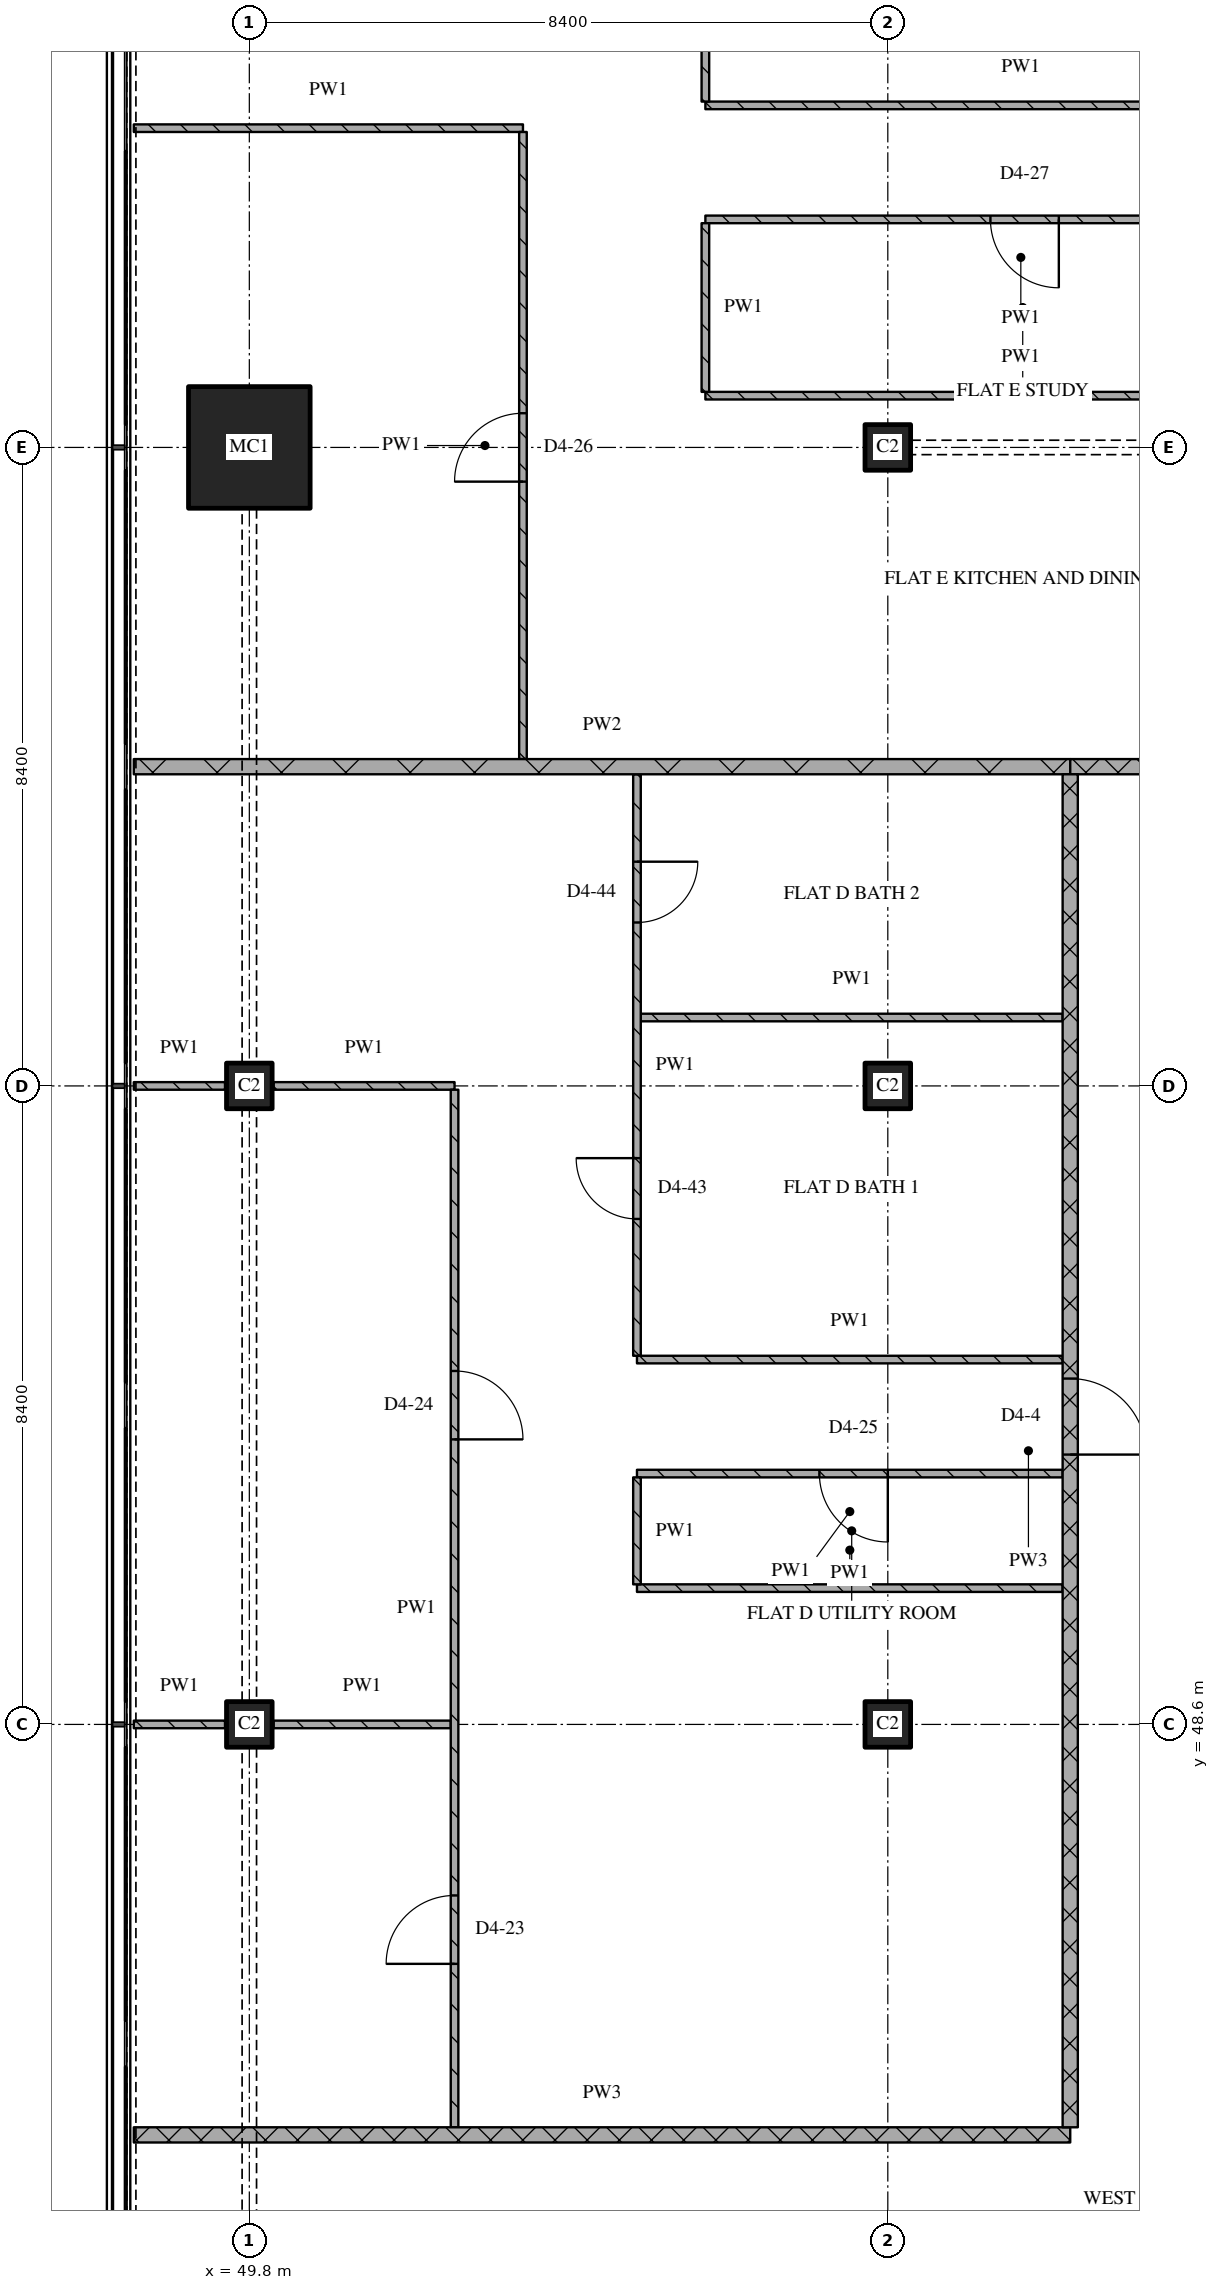
"""IFC4 building model, lengths in metres.
Left out: names, types, materials, properties, quantities, classifications, styles, units other than length and angle.
Written with IfcOpenShell. Run it as: python <this file> out.ifc"""

import sys

from ifc_helpers import new_model, si_unit, direction, frame, frame_2d, origin, origin_2d, place, context, subcontext, project, spatial, rectangle, extrude, element, fill, save


model = new_model("IFC4")
c1 = context("Model", 3, precision=1e-05, world=origin(), true_north=direction((0.0, 1.0)))
c2 = subcontext(c1, "Body", "Model", "MODEL_VIEW")
j1 = project(units=[si_unit("LENGTHUNIT", "METRE"), si_unit("PLANEANGLEUNIT", "RADIAN")], contexts=[c1])
p1 = place(None, origin())
s1 = spatial("IfcSite", under=j1, at=p1, CompositionType="ELEMENT")
p2 = place(p1, origin())
s2 = spatial("IfcBuilding", under=s1, at=p2, CompositionType="ELEMENT")
p3 = place(p2, frame((0.0, 0.0, 237.9)))
s3 = spatial("IfcBuildingStorey", under=s2, at=p3, CompositionType="ELEMENT", Elevation=237.9)
for number, where, z_axis, x_axis in (
    (1, (49.8, 48.6, 0.0), (0.0, 0.0, 1.0), (1.0, 0.0, 0.0)),
    (2, (49.8, 57.0, 0.0), (0.0, 0.0, 1.0), (1.0, 0.0, 0.0)),
):
    element("IfcColumn", number, at=place(p3, frame(where, z_axis=z_axis, x_axis=x_axis)), inside=s3, PredefinedType="COLUMN", context=c2, shape_type="SweptSolid", body=[
        extrude(rectangle(XDim=0.6, YDim=0.6, at=origin_2d()), origin(), (0.0, 0.0, 1.0), 3.6),
    ])
p4 = place(p3, frame((49.8, 65.4, 0.0), z_axis=(0.0, 0.0, 1.0), x_axis=(1.0, 0.0, 0.0)))
e3 = element("IfcColumn", 3, at=p4, inside=s3, PredefinedType="COLUMN", context=c2, shape_type="SweptSolid", body=[
    extrude(rectangle(XDim=1.6, YDim=1.6, at=origin_2d()), origin(), (0.0, 0.0, 1.0), 3.6),
])
for number, where, z_axis, x_axis in (
    (4, (58.2, 48.6, 0.0), (0.0, 0.0, 1.0), (1.0, 0.0, 0.0)),
    (5, (58.2, 57.0, 0.0), (0.0, 0.0, 1.0), (1.0, 0.0, 0.0)),
    (6, (58.2, 65.4, 0.0), (0.0, 0.0, 1.0), (1.0, 0.0, 0.0)),
):
    element("IfcColumn", number, at=place(p3, frame(where, z_axis=z_axis, x_axis=x_axis)), inside=s3, PredefinedType="COLUMN", context=c2, shape_type="SweptSolid", body=[
        extrude(rectangle(XDim=0.6, YDim=0.6, at=origin_2d()), origin(), (0.0, 0.0, 1.0), 3.6),
    ])
p5 = place(p3, frame((48.28, 43.2, 0.0), z_axis=(0.0, 0.0, 1.0), x_axis=(1.0, 0.0, 0.0)))
e7 = element("IfcWall", 7, at=p5, inside=s3, PredefinedType="PARTITIONING", context=c2, shape_type="SweptSolid", body=[
    extrude(rectangle(XDim=12.32, YDim=0.2, at=frame_2d((6.16, 0.0))), origin(), (0.0, 0.0, 1.0), 3.32),
])
p6 = place(p3, frame((48.28, 48.6, 0.0), z_axis=(0.0, 0.0, 1.0), x_axis=(1.0, 0.0, 0.0)))
e8 = element("IfcWall", 8, at=p6, inside=s3, PredefinedType="PARTITIONING", context=c2, shape_type="SweptSolid", body=[
    extrude(rectangle(XDim=1.2, YDim=0.1, at=frame_2d((0.6, 0.0))), origin(), (0.0, 0.0, 1.0), 3.32),
])
p7 = place(p3, frame((50.12, 48.6, 0.0), z_axis=(0.0, 0.0, 1.0), x_axis=(1.0, 0.0, 0.0)))
e9 = element("IfcWall", 9, at=p7, inside=s3, PredefinedType="PARTITIONING", context=c2, shape_type="SweptSolid", body=[
    extrude(rectangle(XDim=2.33, YDim=0.1, at=frame_2d((1.165, 0.0))), origin(), (0.0, 0.0, 1.0), 3.32),
])
p8 = place(p3, frame((54.9, 50.393, 0.0), z_axis=(0.0, 0.0, 1.0), x_axis=(1.0, 0.0, 0.0)))
e10 = element("IfcWall", 10, at=p8, inside=s3, PredefinedType="PARTITIONING", context=c2, shape_type="SweptSolid", body=[
    extrude(rectangle(XDim=5.6, YDim=0.1, at=frame_2d((2.8, 0.0))), origin(), (0.0, 0.0, 1.0), 3.32),
])
p9 = place(p3, frame((60.5, 51.9, 0.0), z_axis=(0.0, 0.0, 1.0), x_axis=(-1.0, 0.0, 0.0)))
e11 = element("IfcWall", 11, at=p9, inside=s3, PredefinedType="PARTITIONING", context=c2, shape_type="SweptSolid", body=[
    extrude(rectangle(XDim=5.6, YDim=0.1, at=frame_2d((2.8, 0.0))), origin(), (0.0, 0.0, 1.0), 3.32),
])
p10 = place(p9, frame((2.3, 0.0, 0.0)))
e12 = element("IfcOpeningElement", 12, at=p10, cuts=e11, PredefinedType="OPENING", context=c2, shape_type="SweptSolid", body=[
    extrude(rectangle(XDim=0.9, YDim=2.1, at=frame_2d((0.45, 1.05))), frame((0.0, 0.06, 0.0), z_axis=(0.0, -1.0, 0.0), x_axis=(1.0, 0.0, 0.0)), (0.0, 0.0, 1.0), 0.12),
])
p11 = place(p3, frame((54.9, 53.4, 0.0), z_axis=(0.0, 0.0, 1.0), x_axis=(1.0, 0.0, 0.0)))
e13 = element("IfcWall", 13, at=p11, inside=s3, PredefinedType="PARTITIONING", context=c2, shape_type="SweptSolid", body=[
    extrude(rectangle(XDim=5.6, YDim=0.1, at=frame_2d((2.8, 0.0))), origin(), (0.0, 0.0, 1.0), 3.32),
])
p12 = place(p3, frame((48.28, 57.0, 0.0), z_axis=(0.0, 0.0, 1.0), x_axis=(1.0, 0.0, 0.0)))
e14 = element("IfcWall", 14, at=p12, inside=s3, PredefinedType="PARTITIONING", context=c2, shape_type="SweptSolid", body=[
    extrude(rectangle(XDim=1.2, YDim=0.1, at=frame_2d((0.6, 0.0))), origin(), (0.0, 0.0, 1.0), 3.32),
])
p13 = place(p3, frame((50.12, 57.0, 0.0), z_axis=(0.0, 0.0, 1.0), x_axis=(1.0, 0.0, 0.0)))
e15 = element("IfcWall", 15, at=p13, inside=s3, PredefinedType="PARTITIONING", context=c2, shape_type="SweptSolid", body=[
    extrude(rectangle(XDim=2.38, YDim=0.1, at=frame_2d((1.19, 0.0))), origin(), (0.0, 0.0, 1.0), 3.32),
])
p14 = place(p3, frame((54.95, 57.9, 0.0), z_axis=(0.0, 0.0, 1.0), x_axis=(1.0, 0.0, 0.0)))
e16 = element("IfcWall", 16, at=p14, inside=s3, PredefinedType="PARTITIONING", context=c2, shape_type="SweptSolid", body=[
    extrude(rectangle(XDim=5.55, YDim=0.1, at=frame_2d((2.775, 0.0))), origin(), (0.0, 0.0, 1.0), 3.32),
])
p15 = place(p3, frame((60.6, 61.2, 0.0), z_axis=(0.0, 0.0, 1.0), x_axis=(1.0, 0.0, 0.0)))
e17 = element("IfcWall", 17, at=p15, inside=s3, PredefinedType="PARTITIONING", context=c2, shape_type="SweptSolid", body=[
    extrude(rectangle(XDim=3.6, YDim=0.2, at=frame_2d((1.8, 0.0))), origin(), (0.0, 0.0, 1.0), 3.32),
])
p16 = place(p3, frame((48.28, 61.2, 0.0), z_axis=(0.0, 0.0, 1.0), x_axis=(1.0, 0.0, 0.0)))
e18 = element("IfcWall", 18, at=p16, inside=s3, PredefinedType="PARTITIONING", context=c2, shape_type="SweptSolid", body=[
    extrude(rectangle(XDim=12.32, YDim=0.2, at=frame_2d((6.16, 0.0))), origin(), (0.0, 0.0, 1.0), 3.32),
])
p17 = place(p3, frame((55.8, 66.081, 0.0), z_axis=(0.0, 0.0, 1.0), x_axis=(1.0, 0.0, 0.0)))
e19 = element("IfcWall", 19, at=p17, inside=s3, PredefinedType="PARTITIONING", context=c2, shape_type="SweptSolid", body=[
    extrude(rectangle(XDim=8.3, YDim=0.1, at=frame_2d((4.15, 0.0))), origin(), (0.0, 0.0, 1.0), 3.32),
])
p18 = place(p3, frame((64.1, 68.4, 0.0), z_axis=(0.0, 0.0, 1.0), x_axis=(-1.0, 0.0, 0.0)))
e20 = element("IfcWall", 20, at=p18, inside=s3, PredefinedType="PARTITIONING", context=c2, shape_type="SweptSolid", body=[
    extrude(rectangle(XDim=8.3, YDim=0.1, at=frame_2d((4.15, 0.0))), origin(), (0.0, 0.0, 1.0), 3.32),
])
p19 = place(p18, frame((3.65, 0.0, 0.0)))
e21 = element("IfcOpeningElement", 21, at=p19, cuts=e20, PredefinedType="OPENING", context=c2, shape_type="SweptSolid", body=[
    extrude(rectangle(XDim=0.9, YDim=2.1, at=frame_2d((0.45, 1.05))), frame((0.0, 0.06, 0.0), z_axis=(0.0, -1.0, 0.0), x_axis=(1.0, 0.0, 0.0)), (0.0, 0.0, 1.0), 0.12),
])
p20 = place(p3, frame((48.28, 69.6, 0.0), z_axis=(0.0, 0.0, 1.0), x_axis=(1.0, 0.0, 0.0)))
e22 = element("IfcWall", 22, at=p20, inside=s3, PredefinedType="PARTITIONING", context=c2, shape_type="SweptSolid", body=[
    extrude(rectangle(XDim=5.12, YDim=0.1, at=frame_2d((2.56, 0.0))), origin(), (0.0, 0.0, 1.0), 3.32),
])
p21 = place(p3, frame((55.8, 69.9, 0.0), z_axis=(0.0, 0.0, 1.0), x_axis=(1.0, 0.0, 0.0)))
e23 = element("IfcWall", 23, at=p21, inside=s3, PredefinedType="PARTITIONING", context=c2, shape_type="SweptSolid", body=[
    extrude(rectangle(XDim=8.3, YDim=0.1, at=frame_2d((4.15, 0.0))), origin(), (0.0, 0.0, 1.0), 3.32),
])
p22 = place(p3, frame((52.5, 43.3, 0.0), z_axis=(0.0, 0.0, 1.0), x_axis=(0.0, 1.0, 0.0)))
e24 = element("IfcWall", 24, at=p22, inside=s3, PredefinedType="PARTITIONING", context=c2, shape_type="SweptSolid", body=[
    extrude(rectangle(XDim=13.65, YDim=0.1, at=frame_2d((6.825, 0.0))), origin(), (0.0, 0.0, 1.0), 3.32),
])
p23 = place(p22, frame((2.15, 0.0, 0.0)))
e25 = element("IfcOpeningElement", 25, at=p23, cuts=e24, PredefinedType="OPENING", context=c2, shape_type="SweptSolid", body=[
    extrude(rectangle(XDim=0.9, YDim=2.1, at=frame_2d((0.45, 1.05))), frame((0.0, 0.06, 0.0), z_axis=(0.0, -1.0, 0.0), x_axis=(1.0, 0.0, 0.0)), (0.0, 0.0, 1.0), 0.12),
])
p24 = place(p22, frame((9.05, 0.0, 0.0)))
e26 = element("IfcOpeningElement", 26, at=p24, cuts=e24, PredefinedType="OPENING", context=c2, shape_type="SweptSolid", body=[
    extrude(rectangle(XDim=0.9, YDim=2.1, at=frame_2d((0.45, 1.05))), frame((0.0, 0.06, 0.0), z_axis=(0.0, -1.0, 0.0), x_axis=(1.0, 0.0, 0.0)), (0.0, 0.0, 1.0), 0.12),
])
p25 = place(p3, frame((53.4, 61.3, 0.0), z_axis=(0.0, 0.0, 1.0), x_axis=(0.0, 1.0, 0.0)))
e27 = element("IfcWall", 27, at=p25, inside=s3, PredefinedType="PARTITIONING", context=c2, shape_type="SweptSolid", body=[
    extrude(rectangle(XDim=8.25, YDim=0.1, at=frame_2d((4.125, 0.0))), origin(), (0.0, 0.0, 1.0), 3.32),
])
p26 = place(p25, frame((3.65, 0.0, 0.0)))
e28 = element("IfcOpeningElement", 28, at=p26, cuts=e27, PredefinedType="OPENING", context=c2, shape_type="SweptSolid", body=[
    extrude(rectangle(XDim=0.9, YDim=2.1, at=frame_2d((0.45, 1.05))), frame((0.0, 0.06, 0.0), z_axis=(0.0, -1.0, 0.0), x_axis=(1.0, 0.0, 0.0)), (0.0, 0.0, 1.0), 0.12),
])
p27 = place(p3, frame((54.9, 51.85, 0.0), z_axis=(0.0, 0.0, 1.0), x_axis=(0.0, -1.0, 0.0)))
e29 = element("IfcWall", 29, at=p27, inside=s3, PredefinedType="PARTITIONING", context=c2, shape_type="SweptSolid", body=[
    extrude(rectangle(XDim=1.407, YDim=0.1, at=frame_2d((0.704, 0.0))), origin(), (0.0, 0.0, 1.0), 3.32),
])
p28 = place(p3, frame((54.9, 61.1, 0.0), z_axis=(0.0, 0.0, 1.0), x_axis=(0.0, -1.0, 0.0)))
e30 = element("IfcWall", 30, at=p28, inside=s3, PredefinedType="PARTITIONING", context=c2, shape_type="SweptSolid", body=[
    extrude(rectangle(XDim=7.65, YDim=0.1, at=frame_2d((3.825, 0.0))), origin(), (0.0, 0.0, 1.0), 3.32),
])
p29 = place(p28, frame((1.15, 0.0, 0.0)))
e31 = element("IfcOpeningElement", 31, at=p29, cuts=e30, PredefinedType="OPENING", context=c2, shape_type="SweptSolid", body=[
    extrude(rectangle(XDim=0.8, YDim=2.1, at=frame_2d((0.4, 1.05))), frame((0.0, 0.06, 0.0), z_axis=(0.0, -1.0, 0.0), x_axis=(1.0, 0.0, 0.0)), (0.0, 0.0, 1.0), 0.12),
])
p30 = place(p28, frame((5.05, 0.0, 0.0)))
e32 = element("IfcOpeningElement", 32, at=p30, cuts=e30, PredefinedType="OPENING", context=c2, shape_type="SweptSolid", body=[
    extrude(rectangle(XDim=0.8, YDim=2.1, at=frame_2d((0.4, 1.05))), frame((0.0, 0.06, 0.0), z_axis=(0.0, -1.0, 0.0), x_axis=(1.0, 0.0, 0.0)), (0.0, 0.0, 1.0), 0.12),
])
p31 = place(p3, frame((55.8, 68.35, 0.0), z_axis=(0.0, 0.0, 1.0), x_axis=(0.0, -1.0, 0.0)))
e33 = element("IfcWall", 33, at=p31, inside=s3, PredefinedType="PARTITIONING", context=c2, shape_type="SweptSolid", body=[
    extrude(rectangle(XDim=2.219, YDim=0.1, at=frame_2d((1.109, 0.0))), origin(), (0.0, 0.0, 1.0), 3.32),
])
p32 = place(p3, frame((55.8, 75.32, 0.0), z_axis=(0.0, 0.0, 1.0), x_axis=(0.0, -1.0, 0.0)))
e34 = element("IfcWall", 34, at=p32, inside=s3, PredefinedType="PARTITIONING", context=c2, shape_type="SweptSolid", body=[
    extrude(rectangle(XDim=5.37, YDim=0.1, at=frame_2d((2.685, 0.0))), origin(), (0.0, 0.0, 1.0), 3.32),
])
p33 = place(p32, frame((0.542, 0.0, 0.0)))
e35 = element("IfcOpeningElement", 35, at=p33, cuts=e34, PredefinedType="OPENING", context=c2, shape_type="SweptSolid", body=[
    extrude(rectangle(XDim=0.9, YDim=2.1, at=frame_2d((0.45, 1.05))), frame((0.0, 0.06, 0.0), z_axis=(0.0, -1.0, 0.0), x_axis=(1.0, 0.0, 0.0)), (0.0, 0.0, 1.0), 0.12),
])
p34 = place(p32, frame((3.443, 0.0, 0.0)))
e36 = element("IfcOpeningElement", 36, at=p34, cuts=e34, PredefinedType="OPENING", context=c2, shape_type="SweptSolid", body=[
    extrude(rectangle(XDim=0.8, YDim=2.1, at=frame_2d((0.4, 1.05))), frame((0.0, 0.06, 0.0), z_axis=(0.0, -1.0, 0.0), x_axis=(1.0, 0.0, 0.0)), (0.0, 0.0, 1.0), 0.12),
])
p35 = place(p3, frame((60.6, 43.3, 0.0), z_axis=(0.0, 0.0, 1.0), x_axis=(0.0, 1.0, 0.0)))
e37 = element("IfcWall", 37, at=p35, inside=s3, PredefinedType="PARTITIONING", context=c2, shape_type="SweptSolid", body=[
    extrude(rectangle(XDim=17.8, YDim=0.2, at=frame_2d((8.9, 0.0))), origin(), (0.0, 0.0, 1.0), 3.32),
])
p36 = place(p35, frame((8.85, 0.0, 0.0)))
e38 = element("IfcOpeningElement", 38, at=p36, cuts=e37, PredefinedType="OPENING", context=c2, shape_type="SweptSolid", body=[
    extrude(rectangle(XDim=1.0, YDim=2.1, at=frame_2d((0.5, 1.05))), frame((0.0, 0.11, 0.0), z_axis=(0.0, -1.0, 0.0), x_axis=(1.0, 0.0, 0.0)), (0.0, 0.0, 1.0), 0.22),
])
p37 = place(p10, origin())
e39 = element("IfcDoor", 39, at=p37, inside=s3, OperationType="SINGLE_SWING_LEFT", PredefinedType="DOOR", context=c2, shape_type="SweptSolid", body=[
    extrude(rectangle(XDim=0.9, YDim=2.1, at=frame_2d((0.45, 1.05))), frame((0.0, 0.025, 0.0), z_axis=(0.0, -1.0, 0.0), x_axis=(1.0, 0.0, 0.0)), (0.0, 0.0, 1.0), 0.05),
])
fill(e12, e39)
p38 = place(p19, origin())
e40 = element("IfcDoor", 40, at=p38, inside=s3, OperationType="SINGLE_SWING_LEFT", PredefinedType="DOOR", context=c2, shape_type="SweptSolid", body=[
    extrude(rectangle(XDim=0.9, YDim=2.1, at=frame_2d((0.45, 1.05))), frame((0.0, 0.025, 0.0), z_axis=(0.0, -1.0, 0.0), x_axis=(1.0, 0.0, 0.0)), (0.0, 0.0, 1.0), 0.05),
])
fill(e21, e40)
p39 = place(p23, origin())
e41 = element("IfcDoor", 41, at=p39, inside=s3, OperationType="SINGLE_SWING_LEFT", PredefinedType="DOOR", context=c2, shape_type="SweptSolid", body=[
    extrude(rectangle(XDim=0.9, YDim=2.1, at=frame_2d((0.45, 1.05))), frame((0.0, 0.025, 0.0), z_axis=(0.0, -1.0, 0.0), x_axis=(1.0, 0.0, 0.0)), (0.0, 0.0, 1.0), 0.05),
])
fill(e25, e41)
p40 = place(p24, origin())
e42 = element("IfcDoor", 42, at=p40, inside=s3, OperationType="SINGLE_SWING_RIGHT", PredefinedType="DOOR", context=c2, shape_type="SweptSolid", body=[
    extrude(rectangle(XDim=0.9, YDim=2.1, at=frame_2d((0.45, 1.05))), frame((0.0, 0.025, 0.0), z_axis=(0.0, -1.0, 0.0), x_axis=(1.0, 0.0, 0.0)), (0.0, 0.0, 1.0), 0.05),
])
fill(e26, e42)
p41 = place(p26, origin())
e43 = element("IfcDoor", 43, at=p41, inside=s3, OperationType="SINGLE_SWING_LEFT", PredefinedType="DOOR", context=c2, shape_type="SweptSolid", body=[
    extrude(rectangle(XDim=0.9, YDim=2.1, at=frame_2d((0.45, 1.05))), frame((0.0, 0.025, 0.0), z_axis=(0.0, -1.0, 0.0), x_axis=(1.0, 0.0, 0.0)), (0.0, 0.0, 1.0), 0.05),
])
fill(e28, e43)
p42 = place(p29, origin())
e44 = element("IfcDoor", 44, at=p42, inside=s3, OperationType="SINGLE_SWING_LEFT", PredefinedType="DOOR", context=c2, shape_type="SweptSolid", body=[
    extrude(rectangle(XDim=0.8, YDim=2.1, at=frame_2d((0.4, 1.05))), frame((0.0, 0.025, 0.0), z_axis=(0.0, -1.0, 0.0), x_axis=(1.0, 0.0, 0.0)), (0.0, 0.0, 1.0), 0.05),
])
fill(e31, e44)
p43 = place(p30, origin())
e45 = element("IfcDoor", 45, at=p43, inside=s3, OperationType="SINGLE_SWING_RIGHT", PredefinedType="DOOR", context=c2, shape_type="SweptSolid", body=[
    extrude(rectangle(XDim=0.8, YDim=2.1, at=frame_2d((0.4, 1.05))), frame((0.0, 0.025, 0.0), z_axis=(0.0, -1.0, 0.0), x_axis=(1.0, 0.0, 0.0)), (0.0, 0.0, 1.0), 0.05),
])
fill(e32, e45)
p44 = place(p36, origin())
e46 = element("IfcDoor", 46, at=p44, inside=s3, OperationType="SINGLE_SWING_RIGHT", PredefinedType="DOOR", context=c2, shape_type="SweptSolid", body=[
    extrude(rectangle(XDim=1.0, YDim=2.1, at=frame_2d((0.5, 1.05))), frame((0.0, 0.025, 0.0), z_axis=(0.0, -1.0, 0.0), x_axis=(1.0, 0.0, 0.0)), (0.0, 0.0, 1.0), 0.05),
])
fill(e38, e46)
save(model, sys.argv[1])
